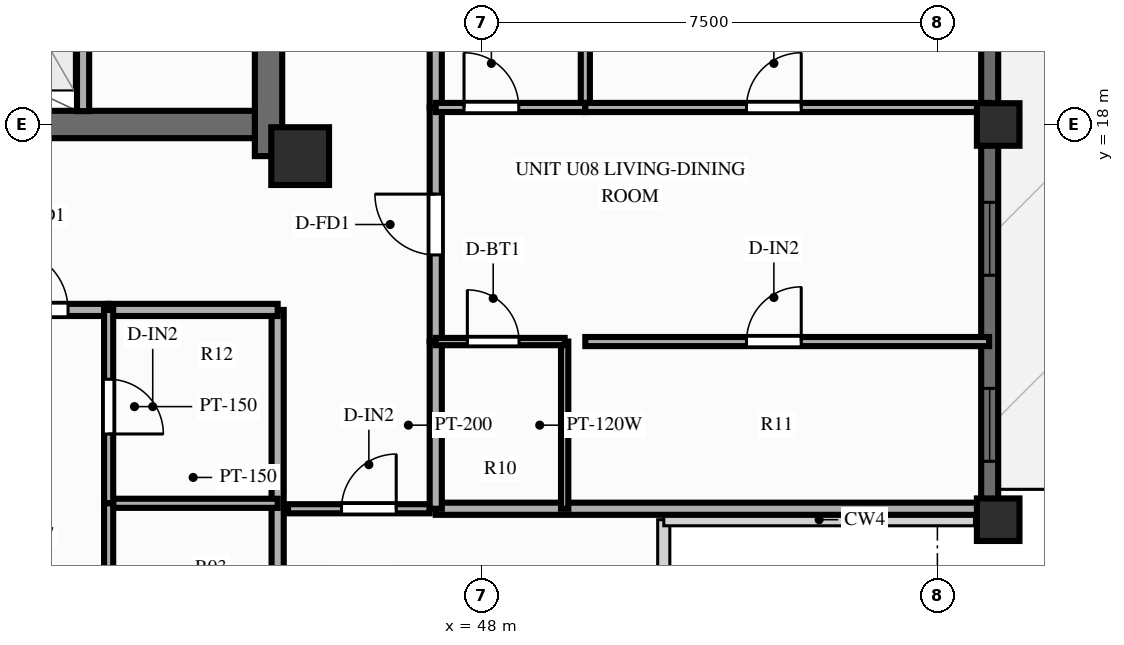
"""IFC4 building model, lengths in metres.
Left out: names, types, materials, properties, quantities, classifications, styles, units other than length and angle.
Written with IfcOpenShell. Run it as: python <this file> out.ifc"""

import sys

from ifc_helpers import new_model, si_unit, direction, frame, frame_2d, origin, origin_2d, place, context, subcontext, project, spatial, rectangle, extrude, source, transform, mapped, element, fill, save


model = new_model("IFC4")
c1 = context("Model", 3, precision=1e-05, world=origin(), true_north=direction((0.0, 1.0)))
c2 = subcontext(c1, "Body", "Model", "MODEL_VIEW")
j1 = project(units=[si_unit("LENGTHUNIT", "METRE"), si_unit("PLANEANGLEUNIT", "RADIAN")], contexts=[c1])
p1 = place(None, origin())
s1 = spatial("IfcSite", under=j1, at=p1, CompositionType="ELEMENT")
p2 = place(p1, origin())
s2 = spatial("IfcBuilding", under=s1, at=p2, CompositionType="ELEMENT")
p3 = place(p2, frame((0.0, 0.0, 216.3)))
s3 = spatial("IfcBuildingStorey", under=s2, at=p3, CompositionType="ELEMENT", Elevation=216.3)
p4 = place(p3, frame((44.5, 17.48, 0.0), z_axis=(0.0, 0.0, 1.0), x_axis=(0.0, 1.0, 0.0)))
e1 = element("IfcWall", 1, at=p4, inside=s3, PredefinedType="SHEAR", context=c2, shape_type="SweptSolid", body=[
    extrude(rectangle(XDim=19.04, YDim=0.45, at=frame_2d((9.52, 0.0))), origin(), (0.0, 0.0, 1.0), 3.9),
])
p5 = place(p4, frame((12.67, 0.0, 0.0), z_axis=(0.0, 0.0, 1.0), x_axis=(-1.0, 0.0, 0.0)))
e2 = element("IfcOpeningElement", 2, at=p5, cuts=e1, PredefinedType="OPENING", context=c2, shape_type="SweptSolid", body=[
    extrude(rectangle(XDim=1.1, YDim=2.15, at=frame_2d((0.55, 1.075))), frame((0.0, 0.237, 0.0), z_axis=(0.0, -1.0, 0.0), x_axis=(1.0, 0.0, 0.0)), (0.0, 0.0, 1.0), 0.474),
])
p6 = place(p3, frame((31.725, 18.0, 0.0), z_axis=(0.0, 0.0, 1.0), x_axis=(1.0, 0.0, 0.0)))
e3 = element("IfcWall", 3, at=p6, inside=s3, PredefinedType="SHEAR", context=c2, shape_type="SweptSolid", body=[
    extrude(rectangle(XDim=12.55, YDim=0.45, at=frame_2d((6.275, 0.0))), origin(), (0.0, 0.0, 1.0), 3.9),
])
m1 = source(origin(), c2, "Body", "SweptSolid", [
    extrude(rectangle(XDim=0.95, YDim=0.95, at=origin_2d()), origin(), (0.0, 0.0, 1.0), 3.9),
])
p7 = place(p3, frame((45.02, 17.48, 0.0), z_axis=(0.0, 0.0, 1.0), x_axis=(1.0, 0.0, 0.0)))
e4 = element("IfcColumn", 4, at=p7, inside=s3, PredefinedType="COLUMN", context=c2, shape_type="MappedRepresentation", body=[
    mapped(m1, transform((0.0, 0.0, 0.0), scale=1.0)),
])
m2 = source(origin(), c2, "Body", "SweptSolid", [
    extrude(rectangle(XDim=0.7, YDim=0.7, at=origin_2d()), origin(), (0.0, 0.0, 1.0), 3.9),
])
for number, where, z_axis, x_axis in (
    (5, (56.5, 11.5, 0.0), (0.0, 0.0, 1.0), (1.0, 0.0, 0.0)),
    (6, (56.5, 18.0, 0.0), (0.0, 0.0, 1.0), (1.0, 0.0, 0.0)),
):
    element("IfcColumn", number, at=place(p3, frame(where, z_axis=z_axis, x_axis=x_axis)), inside=s3, PredefinedType="COLUMN", context=c2, shape_type="MappedRepresentation", body=[
        mapped(m2, transform((0.0, 0.0, 0.0), scale=1.0)),
    ])
p8 = place(p3, frame((56.36, 11.5, 0.0), z_axis=(0.0, 0.0, 1.0), x_axis=(0.0, 1.0, 0.0)))
e7 = element("IfcWall", 7, at=p8, inside=s3, PredefinedType="SOLIDWALL", context=c2, shape_type="SweptSolid", body=[
    extrude(rectangle(XDim=31.0, YDim=0.28, at=frame_2d((15.5, 0.0))), origin(), (0.0, 0.0, 1.0), 2.44),
])
p9 = place(p8, frame((0.96, 0.0, 0.25)))
e8 = element("IfcOpeningElement", 8, at=p9, cuts=e7, PredefinedType="OPENING", context=c2, shape_type="SweptSolid", body=[
    extrude(rectangle(XDim=1.2, YDim=1.5, at=frame_2d((0.6, 0.75))), frame((0.0, 0.152, 0.0), z_axis=(0.0, -1.0, 0.0), x_axis=(1.0, 0.0, 0.0)), (0.0, 0.0, 1.0), 0.304),
])
p10 = place(p8, frame((4.02, 0.0, 0.25)))
e9 = element("IfcOpeningElement", 9, at=p10, cuts=e7, PredefinedType="OPENING", context=c2, shape_type="SweptSolid", body=[
    extrude(rectangle(XDim=1.2, YDim=1.5, at=frame_2d((0.6, 0.75))), frame((0.0, 0.152, 0.0), z_axis=(0.0, -1.0, 0.0), x_axis=(1.0, 0.0, 0.0)), (0.0, 0.0, 1.0), 0.304),
])
p11 = place(p8, frame((8.089, 0.0, 0.25)))
e10 = element("IfcOpeningElement", 10, at=p11, cuts=e7, PredefinedType="OPENING", context=c2, shape_type="SweptSolid", body=[
    extrude(rectangle(XDim=1.2, YDim=1.5, at=frame_2d((0.6, 0.75))), frame((0.0, 0.152, 0.0), z_axis=(0.0, -1.0, 0.0), x_axis=(1.0, 0.0, 0.0)), (0.0, 0.0, 1.0), 0.304),
])
p12 = place(p8, frame((11.373, 0.0, 0.25)))
e11 = element("IfcOpeningElement", 11, at=p12, cuts=e7, PredefinedType="OPENING", context=c2, shape_type="SweptSolid", body=[
    extrude(rectangle(XDim=1.2, YDim=1.5, at=frame_2d((0.6, 0.75))), frame((0.0, 0.152, 0.0), z_axis=(0.0, -1.0, 0.0), x_axis=(1.0, 0.0, 0.0)), (0.0, 0.0, 1.0), 0.304),
])
p13 = place(p8, frame((15.907, 0.0, 0.0), z_axis=(0.0, 0.0, 1.0), x_axis=(-1.0, 0.0, 0.0)))
e12 = element("IfcOpeningElement", 12, at=p13, cuts=e7, PredefinedType="OPENING", context=c2, shape_type="SweptSolid", body=[
    extrude(rectangle(XDim=1.6, YDim=2.15, at=frame_2d((0.8, 1.075))), frame((0.0, 0.152, 0.0), z_axis=(0.0, -1.0, 0.0), x_axis=(1.0, 0.0, 0.0)), (0.0, 0.0, 1.0), 0.304),
])
p14 = place(p8, frame((18.188, 0.0, 0.25)))
e13 = element("IfcOpeningElement", 13, at=p14, cuts=e7, PredefinedType="OPENING", context=c2, shape_type="SweptSolid", body=[
    extrude(rectangle(XDim=1.2, YDim=1.5, at=frame_2d((0.6, 0.75))), frame((0.0, 0.152, 0.0), z_axis=(0.0, -1.0, 0.0), x_axis=(1.0, 0.0, 0.0)), (0.0, 0.0, 1.0), 0.304),
])
p15 = place(p8, frame((21.484, 0.0, 0.25)))
e14 = element("IfcOpeningElement", 14, at=p15, cuts=e7, PredefinedType="OPENING", context=c2, shape_type="SweptSolid", body=[
    extrude(rectangle(XDim=1.2, YDim=1.5, at=frame_2d((0.6, 0.75))), frame((0.0, 0.152, 0.0), z_axis=(0.0, -1.0, 0.0), x_axis=(1.0, 0.0, 0.0)), (0.0, 0.0, 1.0), 0.304),
])
p16 = place(p8, frame((25.234, 0.0, 0.25)))
e15 = element("IfcOpeningElement", 15, at=p16, cuts=e7, PredefinedType="OPENING", context=c2, shape_type="SweptSolid", body=[
    extrude(rectangle(XDim=1.2, YDim=1.5, at=frame_2d((0.6, 0.75))), frame((0.0, 0.152, 0.0), z_axis=(0.0, -1.0, 0.0), x_axis=(1.0, 0.0, 0.0)), (0.0, 0.0, 1.0), 0.304),
])
p17 = place(p8, frame((28.294, 0.0, 0.25)))
e16 = element("IfcOpeningElement", 16, at=p17, cuts=e7, PredefinedType="OPENING", context=c2, shape_type="SweptSolid", body=[
    extrude(rectangle(XDim=1.2, YDim=1.5, at=frame_2d((0.6, 0.75))), frame((0.0, 0.152, 0.0), z_axis=(0.0, -1.0, 0.0), x_axis=(1.0, 0.0, 0.0)), (0.0, 0.0, 1.0), 0.304),
])
p18 = place(p3, frame((41.45, 18.22, 0.0), z_axis=(0.0, 0.0, 1.0), x_axis=(0.0, 1.0, 0.0)))
e17 = element("IfcWall", 17, at=p18, inside=s3, PredefinedType="PARTITIONING", context=c2, shape_type="SweptSolid", body=[
    extrude(rectangle(XDim=2.86, YDim=0.2, at=frame_2d((1.43, 0.0))), origin(), (0.0, 0.0, 1.0), 3.56),
])
p19 = place(p3, frame((44.82, 11.68, 0.0), z_axis=(0.0, 0.0, 1.0), x_axis=(1.0, 0.0, 0.0)))
e18 = element("IfcWall", 18, at=p19, inside=s3, PredefinedType="PARTITIONING", context=c2, shape_type="SweptSolid", body=[
    extrude(rectangle(XDim=2.33, YDim=0.15, at=frame_2d((1.165, 0.0))), origin(), (0.0, 0.0, 1.0), 2.24),
])
p20 = place(p19, frame((0.88, 0.0, 0.0)))
e19 = element("IfcOpeningElement", 19, at=p20, cuts=e18, PredefinedType="OPENING", context=c2, shape_type="SweptSolid", body=[
    extrude(rectangle(XDim=0.9, YDim=2.1, at=frame_2d((0.45, 1.05))), frame((0.0, 0.087, 0.0), z_axis=(0.0, -1.0, 0.0), x_axis=(1.0, 0.0, 0.0)), (0.0, 0.0, 1.0), 0.174),
])
p21 = place(p3, frame((44.65, 14.95, 0.0), z_axis=(0.0, 0.0, 1.0), x_axis=(0.0, -1.0, 0.0)))
e20 = element("IfcWall", 20, at=p21, inside=s3, PredefinedType="PARTITIONING", context=c2, shape_type="SweptSolid", body=[
    extrude(rectangle(XDim=8.8, YDim=0.2, at=frame_2d((4.4, 0.0))), origin(), (0.0, 0.0, 1.0), 2.44),
])
p22 = place(p3, frame((39.535, 14.95, 0.0), z_axis=(0.0, 0.0, 1.0), x_axis=(1.0, 0.0, 0.0)))
e21 = element("IfcWall", 21, at=p22, inside=s3, PredefinedType="PARTITIONING", context=c2, shape_type="SweptSolid", body=[
    extrude(rectangle(XDim=2.335, YDim=0.2, at=frame_2d((1.168, 0.0))), origin(), (0.0, 0.0, 1.0), 3.56),
])
p23 = place(p22, frame((0.668, 0.0, 0.0)))
e22 = element("IfcOpeningElement", 22, at=p23, cuts=e21, PredefinedType="OPENING", context=c2, shape_type="SweptSolid", body=[
    extrude(rectangle(XDim=1.0, YDim=2.15, at=frame_2d((0.5, 1.075))), frame((0.0, 0.112, 0.0), z_axis=(0.0, -1.0, 0.0), x_axis=(1.0, 0.0, 0.0)), (0.0, 0.0, 1.0), 0.224),
])
p24 = place(p3, frame((41.87, 14.95, 0.0), z_axis=(0.0, 0.0, 1.0), x_axis=(1.0, 0.0, 0.0)))
e23 = element("IfcWall", 23, at=p24, inside=s3, PredefinedType="PARTITIONING", context=c2, shape_type="SweptSolid", body=[
    extrude(rectangle(XDim=2.78, YDim=0.2, at=frame_2d((1.39, 0.0))), origin(), (0.0, 0.0, 1.0), 3.56),
])
p25 = place(p3, frame((41.87, 11.77, 0.0), z_axis=(0.0, 0.0, 1.0), x_axis=(1.0, 0.0, 0.0)))
e24 = element("IfcWall", 24, at=p25, inside=s3, PredefinedType="PARTITIONING", context=c2, shape_type="SweptSolid", body=[
    extrude(rectangle(XDim=2.78, YDim=0.15, at=frame_2d((1.39, 0.0))), origin(), (0.0, 0.0, 1.0), 3.39),
])
p26 = place(p3, frame((41.87, 14.95, 0.0), z_axis=(0.0, 0.0, 1.0), x_axis=(0.0, -1.0, 0.0)))
e25 = element("IfcWall", 25, at=p26, inside=s3, PredefinedType="PARTITIONING", context=c2, shape_type="SweptSolid", body=[
    extrude(rectangle(XDim=3.18, YDim=0.15, at=frame_2d((1.59, 0.0))), origin(), (0.0, 0.0, 1.0), 3.56),
])
p27 = place(p26, frame((1.14, 0.0, 0.0)))
e26 = element("IfcOpeningElement", 26, at=p27, cuts=e25, PredefinedType="OPENING", context=c2, shape_type="SweptSolid", body=[
    extrude(rectangle(XDim=0.9, YDim=2.1, at=frame_2d((0.45, 1.05))), frame((0.0, 0.087, 0.0), z_axis=(0.0, -1.0, 0.0), x_axis=(1.0, 0.0, 0.0)), (0.0, 0.0, 1.0), 0.174),
])
p28 = place(p3, frame((41.87, 11.77, 0.0), z_axis=(0.0, 0.0, 1.0), x_axis=(0.0, -1.0, 0.0)))
e27 = element("IfcWall", 27, at=p28, inside=s3, PredefinedType="PARTITIONING", context=c2, shape_type="SweptSolid", body=[
    extrude(rectangle(XDim=5.62, YDim=0.15, at=frame_2d((2.81, 0.0))), origin(), (0.0, 0.0, 1.0), 3.56),
])
p29 = place(p28, frame((2.183, 0.0, 0.0)))
e28 = element("IfcOpeningElement", 28, at=p29, cuts=e27, PredefinedType="OPENING", context=c2, shape_type="SweptSolid", body=[
    extrude(rectangle(XDim=0.9, YDim=2.1, at=frame_2d((0.45, 1.05))), frame((0.0, 0.087, 0.0), z_axis=(0.0, -1.0, 0.0), x_axis=(1.0, 0.0, 0.0)), (0.0, 0.0, 1.0), 0.174),
])
p30 = place(p3, frame((47.25, 11.68, 0.0), z_axis=(0.0, 0.0, 1.0), x_axis=(1.0, 0.0, 0.0)))
e29 = element("IfcWall", 29, at=p30, inside=s3, PredefinedType="PARTITIONING", context=c2, shape_type="SweptSolid", body=[
    extrude(rectangle(XDim=9.1, YDim=0.2, at=frame_2d((4.55, 0.0))), origin(), (0.0, 0.0, 1.0), 2.24),
])
p31 = place(p3, frame((47.25, 11.68, 0.0), z_axis=(0.0, 0.0, 1.0), x_axis=(0.0, 1.0, 0.0)))
e30 = element("IfcWall", 30, at=p31, inside=s3, PredefinedType="PARTITIONING", context=c2, shape_type="SweptSolid", body=[
    extrude(rectangle(XDim=2.75, YDim=0.2, at=frame_2d((1.375, 0.0))), origin(), (0.0, 0.0, 1.0), 3.56),
])
p32 = place(p3, frame((47.25, 14.43, 0.0), z_axis=(0.0, 0.0, 1.0), x_axis=(0.0, 1.0, 0.0)))
e31 = element("IfcWall", 31, at=p32, inside=s3, PredefinedType="PARTITIONING", context=c2, shape_type="SweptSolid", body=[
    extrude(rectangle(XDim=3.85, YDim=0.2, at=frame_2d((1.925, 0.0))), origin(), (0.0, 0.0, 1.0), 3.56),
])
p33 = place(p32, frame((1.425, 0.0, 0.0)))
e32 = element("IfcOpeningElement", 32, at=p33, cuts=e31, PredefinedType="OPENING", context=c2, shape_type="SweptSolid", body=[
    extrude(rectangle(XDim=1.0, YDim=2.15, at=frame_2d((0.5, 1.075))), frame((0.0, 0.112, 0.0), z_axis=(0.0, -1.0, 0.0), x_axis=(1.0, 0.0, 0.0)), (0.0, 0.0, 1.0), 0.224),
])
p34 = place(p3, frame((47.25, 18.28, 0.0), z_axis=(0.0, 0.0, 1.0), x_axis=(0.0, 1.0, 0.0)))
e33 = element("IfcWall", 33, at=p34, inside=s3, PredefinedType="PARTITIONING", context=c2, shape_type="SweptSolid", body=[
    extrude(rectangle(XDim=3.818, YDim=0.2, at=frame_2d((1.909, 0.0))), origin(), (0.0, 0.0, 1.0), 3.56),
])
p35 = place(p3, frame((49.37, 11.68, 0.0), z_axis=(0.0, 0.0, 1.0), x_axis=(0.0, 1.0, 0.0)))
e34 = element("IfcWall", 34, at=p35, inside=s3, PredefinedType="PARTITIONING", context=c2, shape_type="SweptSolid", body=[
    extrude(rectangle(XDim=2.75, YDim=0.12, at=frame_2d((1.375, 0.0))), origin(), (0.0, 0.0, 1.0), 2.24),
])
p36 = place(p3, frame((49.71, 18.28, 0.0), z_axis=(0.0, 0.0, 1.0), x_axis=(0.0, 1.0, 0.0)))
e35 = element("IfcWall", 35, at=p36, inside=s3, PredefinedType="PARTITIONING", context=c2, shape_type="SweptSolid", body=[
    extrude(rectangle(XDim=3.818, YDim=0.15, at=frame_2d((1.909, 0.0))), origin(), (0.0, 0.0, 1.0), 3.56),
])
p37 = place(p3, frame((47.25, 14.43, 0.0), z_axis=(0.0, 0.0, 1.0), x_axis=(1.0, 0.0, 0.0)))
e36 = element("IfcWall", 36, at=p37, inside=s3, PredefinedType="PARTITIONING", context=c2, shape_type="SweptSolid", body=[
    extrude(rectangle(XDim=2.12, YDim=0.12, at=frame_2d((1.06, 0.0))), origin(), (0.0, 0.0, 1.0), 3.56),
])
p38 = place(p37, frame((0.52, 0.0, 0.0)))
e37 = element("IfcOpeningElement", 37, at=p38, cuts=e36, PredefinedType="OPENING", context=c2, shape_type="SweptSolid", body=[
    extrude(rectangle(XDim=0.85, YDim=2.05, at=frame_2d((0.425, 1.025))), frame((0.0, 0.072, 0.0), z_axis=(0.0, -1.0, 0.0), x_axis=(1.0, 0.0, 0.0)), (0.0, 0.0, 1.0), 0.144),
])
p39 = place(p3, frame((49.71, 14.43, 0.0), z_axis=(0.0, 0.0, 1.0), x_axis=(1.0, 0.0, 0.0)))
e38 = element("IfcWall", 38, at=p39, inside=s3, PredefinedType="PARTITIONING", context=c2, shape_type="SweptSolid", body=[
    extrude(rectangle(XDim=6.64, YDim=0.15, at=frame_2d((3.32, 0.0))), origin(), (0.0, 0.0, 1.0), 3.56),
])
p40 = place(p39, frame((2.651, 0.0, 0.0)))
e39 = element("IfcOpeningElement", 39, at=p40, cuts=e38, PredefinedType="OPENING", context=c2, shape_type="SweptSolid", body=[
    extrude(rectangle(XDim=0.9, YDim=2.1, at=frame_2d((0.45, 1.05))), frame((0.0, 0.087, 0.0), z_axis=(0.0, -1.0, 0.0), x_axis=(1.0, 0.0, 0.0)), (0.0, 0.0, 1.0), 0.174),
])
p41 = place(p3, frame((47.25, 18.28, 0.0), z_axis=(0.0, 0.0, 1.0), x_axis=(1.0, 0.0, 0.0)))
e40 = element("IfcWall", 40, at=p41, inside=s3, PredefinedType="PARTITIONING", context=c2, shape_type="SweptSolid", body=[
    extrude(rectangle(XDim=2.46, YDim=0.15, at=frame_2d((1.23, 0.0))), origin(), (0.0, 0.0, 1.0), 3.56),
])
p42 = place(p41, frame((0.465, 0.0, 0.0)))
e41 = element("IfcOpeningElement", 41, at=p42, cuts=e40, PredefinedType="OPENING", context=c2, shape_type="SweptSolid", body=[
    extrude(rectangle(XDim=0.9, YDim=2.1, at=frame_2d((0.45, 1.05))), frame((0.0, 0.087, 0.0), z_axis=(0.0, -1.0, 0.0), x_axis=(1.0, 0.0, 0.0)), (0.0, 0.0, 1.0), 0.174),
])
p43 = place(p3, frame((49.71, 18.28, 0.0), z_axis=(0.0, 0.0, 1.0), x_axis=(1.0, 0.0, 0.0)))
e42 = element("IfcWall", 42, at=p43, inside=s3, PredefinedType="PARTITIONING", context=c2, shape_type="SweptSolid", body=[
    extrude(rectangle(XDim=6.64, YDim=0.15, at=frame_2d((3.32, 0.0))), origin(), (0.0, 0.0, 1.0), 3.56),
])
p44 = place(p43, frame((2.651, 0.0, 0.0)))
e43 = element("IfcOpeningElement", 43, at=p44, cuts=e42, PredefinedType="OPENING", context=c2, shape_type="SweptSolid", body=[
    extrude(rectangle(XDim=0.9, YDim=2.1, at=frame_2d((0.45, 1.05))), frame((0.0, 0.087, 0.0), z_axis=(0.0, -1.0, 0.0), x_axis=(1.0, 0.0, 0.0)), (0.0, 0.0, 1.0), 0.174),
])
m3 = source(origin(), c2, "Body", "SweptSolid", [
    extrude(rectangle(XDim=1.2, YDim=1.5, at=frame_2d((0.6, 0.75))), frame((0.0, 0.03, 0.0), z_axis=(0.0, -1.0, 0.0), x_axis=(1.0, 0.0, 0.0)), (0.0, 0.0, 1.0), 0.06),
])
p45 = place(p9, origin())
e44 = element("IfcWindow", 44, at=p45, inside=s3, PartitioningType="SINGLE_PANEL", PredefinedType="WINDOW", context=c2, shape_type="MappedRepresentation", body=[
    mapped(m3, transform((0.0, 0.0, 0.0), scale=1.0)),
])
fill(e8, e44)
p46 = place(p10, origin())
e45 = element("IfcWindow", 45, at=p46, inside=s3, PartitioningType="SINGLE_PANEL", PredefinedType="WINDOW", context=c2, shape_type="MappedRepresentation", body=[
    mapped(m3, transform((0.0, 0.0, 0.0), scale=1.0)),
])
fill(e9, e45)
m4 = source(origin(), c2, "Body", "SweptSolid", [
    extrude(rectangle(XDim=0.9, YDim=2.1, at=frame_2d((0.45, 1.05))), frame((0.0, 0.025, 0.0), z_axis=(0.0, -1.0, 0.0), x_axis=(1.0, 0.0, 0.0)), (0.0, 0.0, 1.0), 0.05),
])
p47 = place(p20, origin())
e46 = element("IfcDoor", 46, at=p47, inside=s3, OperationType="SINGLE_SWING_RIGHT", PredefinedType="DOOR", context=c2, shape_type="MappedRepresentation", body=[
    mapped(m4, transform((0.0, 0.0, 0.0), scale=1.0)),
])
fill(e19, e46)
m5 = source(origin(), c2, "Body", "SweptSolid", [
    extrude(rectangle(XDim=1.0, YDim=2.15, at=frame_2d((0.5, 1.075))), frame((0.0, 0.025, 0.0), z_axis=(0.0, -1.0, 0.0), x_axis=(1.0, 0.0, 0.0)), (0.0, 0.0, 1.0), 0.05),
])
p48 = place(p23, origin())
e47 = element("IfcDoor", 47, at=p48, inside=s3, OperationType="SINGLE_SWING_LEFT", PredefinedType="DOOR", context=c2, shape_type="MappedRepresentation", body=[
    mapped(m5, transform((0.0, 0.0, 0.0), scale=1.0)),
])
fill(e22, e47)
p49 = place(p27, origin())
e48 = element("IfcDoor", 48, at=p49, inside=s3, OperationType="SINGLE_SWING_RIGHT", PredefinedType="DOOR", context=c2, shape_type="MappedRepresentation", body=[
    mapped(m4, transform((0.0, 0.0, 0.0), scale=1.0)),
])
fill(e26, e48)
p50 = place(p33, origin())
e49 = element("IfcDoor", 49, at=p50, inside=s3, OperationType="SINGLE_SWING_RIGHT", PredefinedType="DOOR", context=c2, shape_type="MappedRepresentation", body=[
    mapped(m5, transform((0.0, 0.0, 0.0), scale=1.0)),
])
fill(e32, e49)
m6 = source(origin(), c2, "Body", "SweptSolid", [
    extrude(rectangle(XDim=0.85, YDim=2.05, at=frame_2d((0.425, 1.025))), frame((0.0, 0.025, 0.0), z_axis=(0.0, -1.0, 0.0), x_axis=(1.0, 0.0, 0.0)), (0.0, 0.0, 1.0), 0.05),
])
p51 = place(p38, origin())
e50 = element("IfcDoor", 50, at=p51, inside=s3, OperationType="SINGLE_SWING_LEFT", PredefinedType="DOOR", context=c2, shape_type="MappedRepresentation", body=[
    mapped(m6, transform((0.0, 0.0, 0.0), scale=1.0)),
])
fill(e37, e50)
p52 = place(p40, origin())
e51 = element("IfcDoor", 51, at=p52, inside=s3, OperationType="SINGLE_SWING_RIGHT", PredefinedType="DOOR", context=c2, shape_type="MappedRepresentation", body=[
    mapped(m4, transform((0.0, 0.0, 0.0), scale=1.0)),
])
fill(e39, e51)
p53 = place(p42, origin())
e52 = element("IfcDoor", 52, at=p53, inside=s3, OperationType="SINGLE_SWING_LEFT", PredefinedType="DOOR", context=c2, shape_type="MappedRepresentation", body=[
    mapped(m4, transform((0.0, 0.0, 0.0), scale=1.0)),
])
fill(e41, e52)
p54 = place(p44, origin())
e53 = element("IfcDoor", 53, at=p54, inside=s3, OperationType="SINGLE_SWING_RIGHT", PredefinedType="DOOR", context=c2, shape_type="MappedRepresentation", body=[
    mapped(m4, transform((0.0, 0.0, 0.0), scale=1.0)),
])
fill(e43, e53)
save(model, sys.argv[1])
